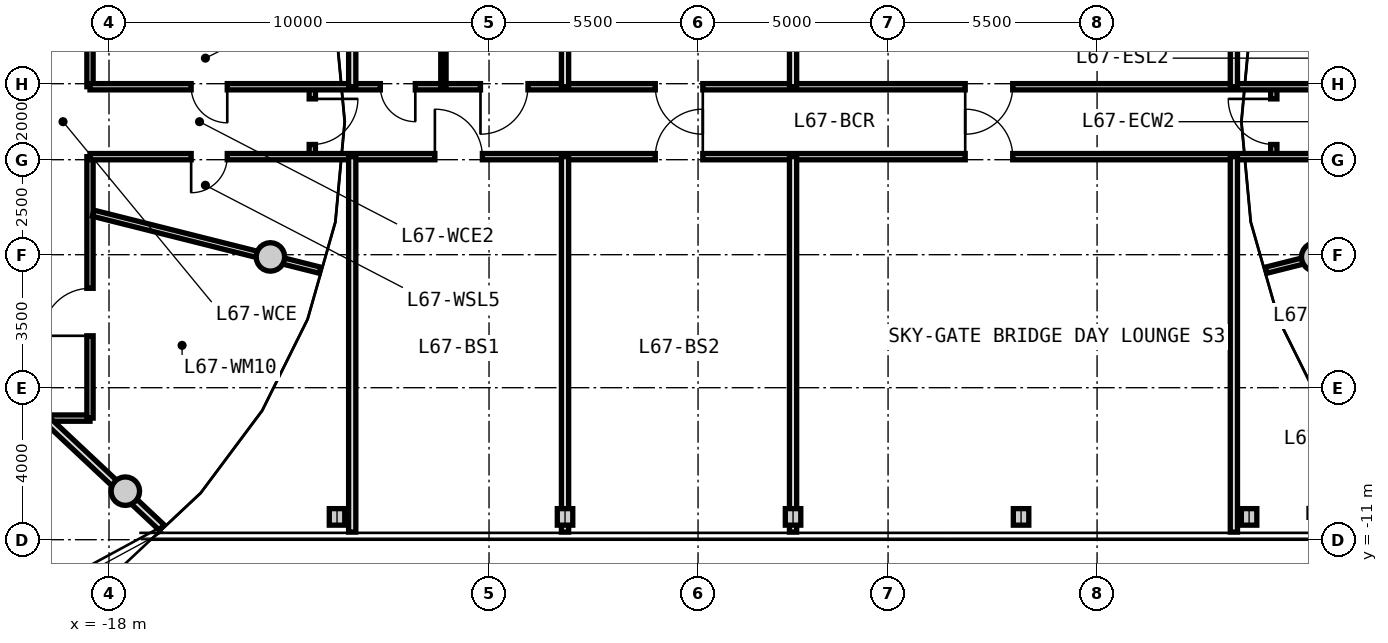
"""IFC4 building model, lengths in metres.
Left out: names, types, materials, properties, quantities, classifications, styles, units other than length and angle.
Written with IfcOpenShell. Run it as: python <this file> out.ifc"""

import sys

from ifc_helpers import new_model, si_unit, direction, frame, frame_2d, origin, origin_2d, place, context, subcontext, project, spatial, rectangle, circle, i_section, extrude, source, transform, mapped, element, fill, save


model = new_model("IFC4")
c1 = context("Model", 3, precision=1e-05, world=origin(), true_north=direction((0.0, 1.0)))
c2 = subcontext(c1, "Body", "Model", "MODEL_VIEW")
j1 = project(units=[si_unit("LENGTHUNIT", "METRE"), si_unit("PLANEANGLEUNIT", "RADIAN")], contexts=[c1])
p1 = place(None, origin())
s1 = spatial("IfcSite", under=j1, at=p1, CompositionType="ELEMENT")
p2 = place(p1, origin())
s2 = spatial("IfcBuilding", under=s1, at=p2, CompositionType="ELEMENT")
p3 = place(p2, frame((0.0, 0.0, 216.95)))
s3 = spatial("IfcBuildingStorey", under=s2, at=p3, CompositionType="ELEMENT", Elevation=216.95)
m1 = source(origin(), c2, "Body", "SweptSolid", [
    extrude(circle(Radius=0.375, at=origin_2d()), origin(), (0.0, 0.0, 1.0), 3.05),
])
for number, where, z_axis, x_axis in (
    (1, (-17.57, -9.723, 0.0), (0.0, 0.0, 1.0), (1.0, 0.0, 0.0)),
    (2, (-13.753, -3.559, 0.0), (0.0, 0.0, 1.0), (1.0, 0.0, 0.0)),
    (3, (13.753, -3.559, 0.0), (0.0, 0.0, 1.0), (1.0, 0.0, 0.0)),
):
    element("IfcColumn", number, at=place(p3, frame(where, z_axis=z_axis, x_axis=x_axis)), inside=s3, PredefinedType="COLUMN", context=c2, shape_type="MappedRepresentation", body=[
        mapped(m1, transform((0.0, 0.0, 0.0), x_axis=(1.0, 0.0, 0.0), y_axis=(0.0, 1.0, 0.0), z_axis=(0.0, 0.0, 1.0), scale=1.0)),
    ])
m2 = source(origin(), c2, "Body", "SweptSolid", [
    extrude(i_section(OverallWidth=0.407, OverallDepth=0.435, WebThickness=0.024, FlangeThickness=0.039, FilletRadius=0.015, at=origin_2d()), origin(), (0.0, 0.0, 1.0), 3.05),
])
for number, where, z_axis, x_axis in (
    (4, (-12.0, -10.4, 0.0), (0.0, 0.0, 1.0), (1.0, 0.0, 0.0)),
    (5, (-6.0, -10.4, 0.0), (0.0, 0.0, 1.0), (1.0, 0.0, 0.0)),
    (6, (0.0, -10.4, 0.0), (0.0, 0.0, 1.0), (1.0, 0.0, 0.0)),
    (7, (6.0, -10.4, 0.0), (0.0, 0.0, 1.0), (1.0, 0.0, 0.0)),
    (8, (12.0, -10.4, 0.0), (0.0, 0.0, 1.0), (1.0, 0.0, 0.0)),
):
    element("IfcColumn", number, at=place(p3, frame(where, z_axis=z_axis, x_axis=x_axis)), inside=s3, PredefinedType="COLUMN", context=c2, shape_type="MappedRepresentation", body=[
        mapped(m2, transform((0.0, 0.0, 0.0), x_axis=(1.0, 0.0, 0.0), y_axis=(0.0, 1.0, 0.0), z_axis=(0.0, 0.0, 1.0), scale=1.0)),
    ])
m3 = source(origin(), c2, "Body", "SweptSolid", [
    extrude(rectangle(XDim=19.0, YDim=0.165, at=frame_2d((9.5, 0.0))), origin(), (0.0, 0.0, 1.0), 2.745),
])
p4 = place(p3, frame((-18.5, -7.8, 0.0), z_axis=(0.0, 0.0, 1.0), x_axis=(-1.0, 0.0, 0.0)))
e9 = element("IfcWall", 9, at=p4, inside=s3, PredefinedType="PARTITIONING", context=c2, shape_type="MappedRepresentation", body=[
    mapped(m3, transform((0.0, 0.0, 0.0), x_axis=(1.0, 0.0, 0.0), y_axis=(0.0, 1.0, 0.0), z_axis=(0.0, 0.0, 1.0), scale=1.0)),
])
p5 = place(p4, frame((14.191, 0.0, 0.0)))
e10 = element("IfcOpeningElement", 10, at=p5, cuts=e9, PredefinedType="OPENING", context=c2, shape_type="SweptSolid", body=[
    extrude(rectangle(XDim=1.25, YDim=2.2, at=frame_2d((0.625, 1.1))), frame((0.0, 0.093, 0.0), z_axis=(0.0, -1.0, 0.0), x_axis=(1.0, 0.0, 0.0)), (0.0, 0.0, 1.0), 0.185),
])
p6 = place(p4, frame((8.875, 0.0, 0.0)))
e11 = element("IfcOpeningElement", 11, at=p6, cuts=e9, PredefinedType="OPENING", context=c2, shape_type="SweptSolid", body=[
    extrude(rectangle(XDim=1.25, YDim=2.2, at=frame_2d((0.625, 1.1))), frame((0.0, 0.093, 0.0), z_axis=(0.0, -1.0, 0.0), x_axis=(1.0, 0.0, 0.0)), (0.0, 0.0, 1.0), 0.185),
])
p7 = place(p4, frame((3.559, 0.0, 0.0)))
e12 = element("IfcOpeningElement", 12, at=p7, cuts=e9, PredefinedType="OPENING", context=c2, shape_type="SweptSolid", body=[
    extrude(rectangle(XDim=1.25, YDim=2.2, at=frame_2d((0.625, 1.1))), frame((0.0, 0.093, 0.0), z_axis=(0.0, -1.0, 0.0), x_axis=(1.0, 0.0, 0.0)), (0.0, 0.0, 1.0), 0.185),
])
m4 = source(origin(), c2, "Body", "SweptSolid", [
    extrude(rectangle(XDim=6.88, YDim=0.165, at=frame_2d((3.44, 0.0))), origin(), (0.0, 0.0, 1.0), 2.745),
])
p8 = place(p3, frame((-18.5, 7.8, 0.0), z_axis=(0.0, 0.0, 1.0), x_axis=(0.0, -1.0, 0.0)))
e13 = element("IfcWall", 13, at=p8, inside=s3, PredefinedType="PARTITIONING", context=c2, shape_type="MappedRepresentation", body=[
    mapped(m4, transform((0.0, 0.0, 0.0), x_axis=(1.0, 0.0, 0.0), y_axis=(0.0, 1.0, 0.0), z_axis=(0.0, 0.0, 1.0), scale=1.0)),
])
p9 = place(p8, frame((3.421, 0.0, 0.0)))
e14 = element("IfcOpeningElement", 14, at=p9, cuts=e13, PredefinedType="OPENING", context=c2, shape_type="SweptSolid", body=[
    extrude(rectangle(XDim=1.05, YDim=2.15, at=frame_2d((0.525, 1.075))), frame((0.0, 0.093, 0.0), z_axis=(0.0, -1.0, 0.0), x_axis=(1.0, 0.0, 0.0)), (0.0, 0.0, 1.0), 0.185),
])
p10 = place(p8, frame((0.856, 0.0, 0.0)))
e15 = element("IfcOpeningElement", 15, at=p10, cuts=e13, PredefinedType="OPENING", context=c2, shape_type="SweptSolid", body=[
    extrude(rectangle(XDim=1.05, YDim=2.15, at=frame_2d((0.525, 1.075))), frame((0.0, 0.093, 0.0), z_axis=(0.0, -1.0, 0.0), x_axis=(1.0, 0.0, 0.0)), (0.0, 0.0, 1.0), 0.185),
])
p11 = place(p3, frame((-18.5, -0.92, 0.0), z_axis=(0.0, 0.0, 1.0), x_axis=(0.0, -1.0, 0.0)))
e16 = element("IfcWall", 16, at=p11, inside=s3, PredefinedType="PARTITIONING", context=c2, shape_type="MappedRepresentation", body=[
    mapped(m4, transform((0.0, 0.0, 0.0), x_axis=(1.0, 0.0, 0.0), y_axis=(0.0, 1.0, 0.0), z_axis=(0.0, 0.0, 1.0), scale=1.0)),
])
p12 = place(p11, frame((3.464, 0.0, 0.0)))
e17 = element("IfcOpeningElement", 17, at=p12, cuts=e16, PredefinedType="OPENING", context=c2, shape_type="SweptSolid", body=[
    extrude(rectangle(XDim=1.25, YDim=2.2, at=frame_2d((0.625, 1.1))), frame((0.0, 0.093, 0.0), z_axis=(0.0, -1.0, 0.0), x_axis=(1.0, 0.0, 0.0)), (0.0, 0.0, 1.0), 0.185),
])
m5 = source(origin(), c2, "Body", "SweptSolid", [
    extrude(rectangle(XDim=6.157, YDim=0.165, at=frame_2d((3.079, 0.0))), origin(), (0.0, 0.0, 1.0), 2.345),
])
p13 = place(p3, frame((-18.42, -2.407, 0.0), z_axis=(0.0, 0.0, 1.0), x_axis=(0.969840867184, -0.243738984038, 0.0)))
e18 = element("IfcWall", 18, at=p13, inside=s3, PredefinedType="PARTITIONING", context=c2, shape_type="MappedRepresentation", body=[
    mapped(m5, transform((0.0, 0.0, 0.0), x_axis=(1.0, 0.0, 0.0), y_axis=(0.0, 1.0, 0.0), z_axis=(0.0, 0.0, 1.0), scale=1.0)),
])
m6 = source(origin(), c2, "Body", "SweptSolid", [
    extrude(rectangle(XDim=4.089, YDim=0.19, at=frame_2d((2.044, 0.0))), origin(), (0.0, 0.0, 1.0), 2.345),
])
p14 = place(p3, frame((-19.598, -7.88, 0.0), z_axis=(0.0, 0.0, 1.0), x_axis=(0.729401273609, -0.684086092577, 0.0)))
e19 = element("IfcWall", 19, at=p14, inside=s3, PredefinedType="PARTITIONING", context=c2, shape_type="MappedRepresentation", body=[
    mapped(m6, transform((0.0, 0.0, 0.0), x_axis=(1.0, 0.0, 0.0), y_axis=(0.0, 1.0, 0.0), z_axis=(0.0, 0.0, 1.0), scale=1.0)),
])
p15 = place(p3, frame((18.42, -2.407, 0.0), z_axis=(0.0, 0.0, 1.0), x_axis=(-0.969840867184, -0.243738984038, 0.0)))
e20 = element("IfcWall", 20, at=p15, inside=s3, PredefinedType="PARTITIONING", context=c2, shape_type="MappedRepresentation", body=[
    mapped(m5, transform((0.0, 0.0, 0.0), x_axis=(1.0, 0.0, 0.0), y_axis=(0.0, 1.0, 0.0), z_axis=(0.0, 0.0, 1.0), scale=1.0)),
])
m7 = source(origin(), c2, "Body", "SweptSolid", [
    extrude(rectangle(XDim=1.84, YDim=0.165, at=frame_2d((0.92, 0.0))), origin(), (0.0, 0.0, 1.0), 2.745),
])
p16 = place(p3, frame((-12.65, -0.92, 0.0), z_axis=(0.0, 0.0, 1.0), x_axis=(0.0, 1.0, 0.0)))
e21 = element("IfcWall", 21, at=p16, inside=s3, PredefinedType="PARTITIONING", context=c2, shape_type="MappedRepresentation", body=[
    mapped(m7, transform((0.0, 0.0, 0.0), x_axis=(1.0, 0.0, 0.0), y_axis=(0.0, 1.0, 0.0), z_axis=(0.0, 0.0, 1.0), scale=1.0)),
])
p17 = place(p16, frame((0.32, 0.0, 0.0)))
e22 = element("IfcOpeningElement", 22, at=p17, cuts=e21, PredefinedType="OPENING", context=c2, shape_type="SweptSolid", body=[
    extrude(rectangle(XDim=1.2, YDim=2.15, at=frame_2d((0.6, 1.075))), frame((0.0, 0.093, 0.0), z_axis=(0.0, -1.0, 0.0), x_axis=(1.0, 0.0, 0.0)), (0.0, 0.0, 1.0), 0.185),
])
p18 = place(p3, frame((12.65, -0.92, 0.0), z_axis=(0.0, 0.0, 1.0), x_axis=(0.0, 1.0, 0.0)))
e23 = element("IfcWall", 23, at=p18, inside=s3, PredefinedType="PARTITIONING", context=c2, shape_type="MappedRepresentation", body=[
    mapped(m7, transform((0.0, 0.0, 0.0), x_axis=(1.0, 0.0, 0.0), y_axis=(0.0, 1.0, 0.0), z_axis=(0.0, 0.0, 1.0), scale=1.0)),
])
p19 = place(p18, frame((0.32, 0.0, 0.0)))
e24 = element("IfcOpeningElement", 24, at=p19, cuts=e23, PredefinedType="OPENING", context=c2, shape_type="SweptSolid", body=[
    extrude(rectangle(XDim=1.2, YDim=2.15, at=frame_2d((0.6, 1.075))), frame((0.0, 0.093, 0.0), z_axis=(0.0, -1.0, 0.0), x_axis=(1.0, 0.0, 0.0)), (0.0, 0.0, 1.0), 0.185),
])
m8 = source(origin(), c2, "Body", "SweptSolid", [
    extrude(rectangle(XDim=37.0, YDim=0.165, at=frame_2d((18.5, 0.0))), origin(), (0.0, 0.0, 1.0), 2.745),
])
p20 = place(p3, frame((-18.5, -0.92, 0.0), z_axis=(0.0, 0.0, 1.0), x_axis=(1.0, 0.0, 0.0)))
e25 = element("IfcWall", 25, at=p20, inside=s3, PredefinedType="PARTITIONING", context=c2, shape_type="MappedRepresentation", body=[
    mapped(m8, transform((0.0, 0.0, 0.0), x_axis=(1.0, 0.0, 0.0), y_axis=(0.0, 1.0, 0.0), z_axis=(0.0, 0.0, 1.0), scale=1.0)),
])
p21 = place(p20, frame((2.662, 0.0, 0.0)))
e26 = element("IfcOpeningElement", 26, at=p21, cuts=e25, PredefinedType="OPENING", context=c2, shape_type="SweptSolid", body=[
    extrude(rectangle(XDim=0.95, YDim=2.1, at=frame_2d((0.475, 1.05))), frame((0.0, 0.093, 0.0), z_axis=(0.0, -1.0, 0.0), x_axis=(1.0, 0.0, 0.0)), (0.0, 0.0, 1.0), 0.185),
])
p22 = place(p20, frame((33.388, 0.0, 0.0)))
e27 = element("IfcOpeningElement", 27, at=p22, cuts=e25, PredefinedType="OPENING", context=c2, shape_type="SweptSolid", body=[
    extrude(rectangle(XDim=0.95, YDim=2.1, at=frame_2d((0.475, 1.05))), frame((0.0, 0.093, 0.0), z_axis=(0.0, -1.0, 0.0), x_axis=(1.0, 0.0, 0.0)), (0.0, 0.0, 1.0), 0.185),
])
p23 = place(p20, frame((9.075, 0.0, 0.0)))
e28 = element("IfcOpeningElement", 28, at=p23, cuts=e25, PredefinedType="OPENING", context=c2, shape_type="SweptSolid", body=[
    extrude(rectangle(XDim=1.25, YDim=2.2, at=frame_2d((0.625, 1.1))), frame((0.0, 0.093, 0.0), z_axis=(0.0, -1.0, 0.0), x_axis=(1.0, 0.0, 0.0)), (0.0, 0.0, 1.0), 0.185),
])
p24 = place(p20, frame((14.875, 0.0, 0.0)))
e29 = element("IfcOpeningElement", 29, at=p24, cuts=e25, PredefinedType="OPENING", context=c2, shape_type="SweptSolid", body=[
    extrude(rectangle(XDim=1.25, YDim=2.2, at=frame_2d((0.625, 1.1))), frame((0.0, 0.093, 0.0), z_axis=(0.0, -1.0, 0.0), x_axis=(1.0, 0.0, 0.0)), (0.0, 0.0, 1.0), 0.185),
])
p25 = place(p20, frame((23.03, 0.0, 0.0)))
e30 = element("IfcOpeningElement", 30, at=p25, cuts=e25, PredefinedType="OPENING", context=c2, shape_type="SweptSolid", body=[
    extrude(rectangle(XDim=1.25, YDim=2.2, at=frame_2d((0.625, 1.1))), frame((0.0, 0.093, 0.0), z_axis=(0.0, -1.0, 0.0), x_axis=(1.0, 0.0, 0.0)), (0.0, 0.0, 1.0), 0.185),
])
p26 = place(p3, frame((-18.5, 0.92, 0.0), z_axis=(0.0, 0.0, 1.0), x_axis=(1.0, 0.0, 0.0)))
e31 = element("IfcWall", 31, at=p26, inside=s3, PredefinedType="PARTITIONING", context=c2, shape_type="MappedRepresentation", body=[
    mapped(m8, transform((0.0, 0.0, 0.0), x_axis=(1.0, 0.0, 0.0), y_axis=(0.0, 1.0, 0.0), z_axis=(0.0, 0.0, 1.0), scale=1.0)),
])
p27 = place(p26, frame((2.662, 0.0, 0.0)))
e32 = element("IfcOpeningElement", 32, at=p27, cuts=e31, PredefinedType="OPENING", context=c2, shape_type="SweptSolid", body=[
    extrude(rectangle(XDim=0.95, YDim=2.1, at=frame_2d((0.475, 1.05))), frame((0.0, 0.093, 0.0), z_axis=(0.0, -1.0, 0.0), x_axis=(1.0, 0.0, 0.0)), (0.0, 0.0, 1.0), 0.185),
])
p28 = place(p26, frame((33.388, 0.0, 0.0)))
e33 = element("IfcOpeningElement", 33, at=p28, cuts=e31, PredefinedType="OPENING", context=c2, shape_type="SweptSolid", body=[
    extrude(rectangle(XDim=0.95, YDim=2.1, at=frame_2d((0.475, 1.05))), frame((0.0, 0.093, 0.0), z_axis=(0.0, -1.0, 0.0), x_axis=(1.0, 0.0, 0.0)), (0.0, 0.0, 1.0), 0.185),
])
p29 = place(p26, frame((7.64, 0.0, 0.0)))
e34 = element("IfcOpeningElement", 34, at=p29, cuts=e31, PredefinedType="OPENING", context=c2, shape_type="SweptSolid", body=[
    extrude(rectangle(XDim=0.92, YDim=2.1, at=frame_2d((0.46, 1.05))), frame((0.0, 0.093, 0.0), z_axis=(0.0, -1.0, 0.0), x_axis=(1.0, 0.0, 0.0)), (0.0, 0.0, 1.0), 0.185),
])
p30 = place(p26, frame((10.275, 0.0, 0.0)))
e35 = element("IfcOpeningElement", 35, at=p30, cuts=e31, PredefinedType="OPENING", context=c2, shape_type="SweptSolid", body=[
    extrude(rectangle(XDim=1.25, YDim=2.2, at=frame_2d((0.625, 1.1))), frame((0.0, 0.093, 0.0), z_axis=(0.0, -1.0, 0.0), x_axis=(1.0, 0.0, 0.0)), (0.0, 0.0, 1.0), 0.185),
])
p31 = place(p26, frame((14.875, 0.0, 0.0)))
e36 = element("IfcOpeningElement", 36, at=p31, cuts=e31, PredefinedType="OPENING", context=c2, shape_type="SweptSolid", body=[
    extrude(rectangle(XDim=1.25, YDim=2.2, at=frame_2d((0.625, 1.1))), frame((0.0, 0.093, 0.0), z_axis=(0.0, -1.0, 0.0), x_axis=(1.0, 0.0, 0.0)), (0.0, 0.0, 1.0), 0.185),
])
p32 = place(p26, frame((23.03, 0.0, 0.0)))
e37 = element("IfcOpeningElement", 37, at=p32, cuts=e31, PredefinedType="OPENING", context=c2, shape_type="SweptSolid", body=[
    extrude(rectangle(XDim=1.25, YDim=2.2, at=frame_2d((0.625, 1.1))), frame((0.0, 0.093, 0.0), z_axis=(0.0, -1.0, 0.0), x_axis=(1.0, 0.0, 0.0)), (0.0, 0.0, 1.0), 0.185),
])
m9 = source(origin(), c2, "Body", "SweptSolid", [
    extrude(rectangle(XDim=9.88, YDim=0.19, at=frame_2d((4.94, 0.0))), origin(), (0.0, 0.0, 1.0), 2.745),
])
for number, where, z_axis, x_axis in (
    (38, (-11.6, -10.8, 0.0), (0.0, 0.0, 1.0), (0.0, 1.0, 0.0)),
    (39, (-11.6, 0.92, 0.0), (0.0, 0.0, 1.0), (0.0, 1.0, 0.0)),
    (40, (11.6, -10.8, 0.0), (0.0, 0.0, 1.0), (0.0, 1.0, 0.0)),
    (41, (11.6, 0.92, 0.0), (0.0, 0.0, 1.0), (0.0, 1.0, 0.0)),
):
    element("IfcWall", number, at=place(p3, frame(where, z_axis=z_axis, x_axis=x_axis)), inside=s3, PredefinedType="PARTITIONING", context=c2, shape_type="MappedRepresentation", body=[
        mapped(m9, transform((0.0, 0.0, 0.0), x_axis=(1.0, 0.0, 0.0), y_axis=(0.0, 1.0, 0.0), z_axis=(0.0, 0.0, 1.0), scale=1.0)),
    ])
m10 = source(origin(), c2, "Body", "SweptSolid", [
    extrude(rectangle(XDim=9.88, YDim=0.19, at=frame_2d((4.94, 0.0))), origin(), (0.0, 0.0, 1.0), 2.045),
])
for number, where, z_axis, x_axis in (
    (42, (-6.0, -10.8, 0.0), (0.0, 0.0, 1.0), (0.0, 1.0, 0.0)),
    (43, (-6.0, 0.92, 0.0), (0.0, 0.0, 1.0), (0.0, 1.0, 0.0)),
):
    element("IfcWall", number, at=place(p3, frame(where, z_axis=z_axis, x_axis=x_axis)), inside=s3, PredefinedType="PARTITIONING", context=c2, shape_type="MappedRepresentation", body=[
        mapped(m10, transform((0.0, 0.0, 0.0), x_axis=(1.0, 0.0, 0.0), y_axis=(0.0, 1.0, 0.0), z_axis=(0.0, 0.0, 1.0), scale=1.0)),
    ])
m11 = source(origin(), c2, "Body", "SweptSolid", [
    extrude(rectangle(XDim=9.88, YDim=0.14, at=frame_2d((4.94, 0.0))), origin(), (0.0, 0.0, 1.0), 2.745),
])
p33 = place(p3, frame((-9.2, 0.92, 0.0), z_axis=(0.0, 0.0, 1.0), x_axis=(0.0, 1.0, 0.0)))
e44 = element("IfcWall", 44, at=p33, inside=s3, PredefinedType="PARTITIONING", context=c2, shape_type="MappedRepresentation", body=[
    mapped(m11, transform((0.0, 0.0, 0.0), x_axis=(1.0, 0.0, 0.0), y_axis=(0.0, 1.0, 0.0), z_axis=(0.0, 0.0, 1.0), scale=1.0)),
])
for number, where, z_axis, x_axis in (
    (45, (0.0, -10.8, 0.0), (0.0, 0.0, 1.0), (0.0, 1.0, 0.0)),
    (46, (0.0, 0.92, 0.0), (0.0, 0.0, 1.0), (0.0, 1.0, 0.0)),
):
    element("IfcWall", number, at=place(p3, frame(where, z_axis=z_axis, x_axis=x_axis)), inside=s3, PredefinedType="PARTITIONING", context=c2, shape_type="MappedRepresentation", body=[
        mapped(m10, transform((0.0, 0.0, 0.0), x_axis=(1.0, 0.0, 0.0), y_axis=(0.0, 1.0, 0.0), z_axis=(0.0, 0.0, 1.0), scale=1.0)),
    ])
m12 = source(origin(), c2, "Body", "SweptSolid", [
    extrude(rectangle(XDim=0.95, YDim=2.1, at=frame_2d((0.475, 1.05))), frame((0.0, 0.025, 0.0), z_axis=(0.0, -1.0, 0.0), x_axis=(1.0, 0.0, 0.0)), (0.0, 0.0, 1.0), 0.05),
])
p34 = place(p21, frame((0.95, 0.0, 0.0), z_axis=(0.0, 0.0, 1.0), x_axis=(-1.0, 0.0, 0.0)))
e47 = element("IfcDoor", 47, at=p34, inside=s3, OperationType="SINGLE_SWING_RIGHT", PredefinedType="DOOR", context=c2, shape_type="MappedRepresentation", body=[
    mapped(m12, transform((0.0, 0.0, 0.0), x_axis=(1.0, 0.0, 0.0), y_axis=(0.0, 1.0, 0.0), z_axis=(0.0, 0.0, 1.0), scale=1.0)),
])
fill(e26, e47)
p35 = place(p27, frame((0.95, 0.0, 0.0), z_axis=(0.0, 0.0, 1.0), x_axis=(-1.0, 0.0, 0.0)))
e48 = element("IfcDoor", 48, at=p35, inside=s3, OperationType="SINGLE_SWING_LEFT", PredefinedType="DOOR", context=c2, shape_type="MappedRepresentation", body=[
    mapped(m12, transform((0.0, 0.0, 0.0), x_axis=(1.0, 0.0, 0.0), y_axis=(0.0, 1.0, 0.0), z_axis=(0.0, 0.0, 1.0), scale=1.0)),
])
fill(e32, e48)
m13 = source(origin(), c2, "Body", "SweptSolid", [
    extrude(rectangle(XDim=1.25, YDim=2.2, at=frame_2d((0.625, 1.1))), frame((0.0, 0.025, 0.0), z_axis=(0.0, -1.0, 0.0), x_axis=(1.0, 0.0, 0.0)), (0.0, 0.0, 1.0), 0.05),
])
p36 = place(p12, frame((1.25, 0.0, 0.0), z_axis=(0.0, 0.0, 1.0), x_axis=(-1.0, 0.0, 0.0)))
e49 = element("IfcDoor", 49, at=p36, inside=s3, OperationType="SINGLE_SWING_LEFT", PredefinedType="DOOR", context=c2, shape_type="MappedRepresentation", body=[
    mapped(m13, transform((0.0, 0.0, 0.0), x_axis=(1.0, 0.0, 0.0), y_axis=(0.0, 1.0, 0.0), z_axis=(0.0, 0.0, 1.0), scale=1.0)),
])
fill(e17, e49)
m14 = source(origin(), c2, "Body", "SweptSolid", [
    extrude(rectangle(XDim=1.2, YDim=2.15, at=frame_2d((0.6, 1.075))), frame((0.0, 0.025, 0.0), z_axis=(0.0, -1.0, 0.0), x_axis=(1.0, 0.0, 0.0)), (0.0, 0.0, 1.0), 0.05),
])
p37 = place(p17, frame((1.2, 0.0, 0.0), z_axis=(0.0, 0.0, 1.0), x_axis=(-1.0, 0.0, 0.0)))
e50 = element("IfcDoor", 50, at=p37, inside=s3, OperationType="SINGLE_SWING_LEFT", PredefinedType="DOOR", context=c2, shape_type="MappedRepresentation", body=[
    mapped(m14, transform((0.0, 0.0, 0.0), x_axis=(1.0, 0.0, 0.0), y_axis=(0.0, 1.0, 0.0), z_axis=(0.0, 0.0, 1.0), scale=1.0)),
])
fill(e22, e50)
p38 = place(p19, origin())
e51 = element("IfcDoor", 51, at=p38, inside=s3, OperationType="SINGLE_SWING_RIGHT", PredefinedType="DOOR", context=c2, shape_type="MappedRepresentation", body=[
    mapped(m14, transform((0.0, 0.0, 0.0), x_axis=(1.0, 0.0, 0.0), y_axis=(0.0, 1.0, 0.0), z_axis=(0.0, 0.0, 1.0), scale=1.0)),
])
fill(e24, e51)
p39 = place(p23, origin())
e52 = element("IfcDoor", 52, at=p39, inside=s3, OperationType="SINGLE_SWING_LEFT", PredefinedType="DOOR", context=c2, shape_type="MappedRepresentation", body=[
    mapped(m13, transform((0.0, 0.0, 0.0), x_axis=(1.0, 0.0, 0.0), y_axis=(0.0, 1.0, 0.0), z_axis=(0.0, 0.0, 1.0), scale=1.0)),
])
fill(e28, e52)
m15 = source(origin(), c2, "Body", "SweptSolid", [
    extrude(rectangle(XDim=0.92, YDim=2.1, at=frame_2d((0.46, 1.05))), frame((0.0, 0.025, 0.0), z_axis=(0.0, -1.0, 0.0), x_axis=(1.0, 0.0, 0.0)), (0.0, 0.0, 1.0), 0.05),
])
p40 = place(p29, frame((0.92, 0.0, 0.0), z_axis=(0.0, 0.0, 1.0), x_axis=(-1.0, 0.0, 0.0)))
e53 = element("IfcDoor", 53, at=p40, inside=s3, OperationType="SINGLE_SWING_LEFT", PredefinedType="DOOR", context=c2, shape_type="MappedRepresentation", body=[
    mapped(m15, transform((0.0, 0.0, 0.0), x_axis=(1.0, 0.0, 0.0), y_axis=(0.0, 1.0, 0.0), z_axis=(0.0, 0.0, 1.0), scale=1.0)),
])
fill(e34, e53)
p41 = place(p30, frame((1.25, 0.0, 0.0), z_axis=(0.0, 0.0, 1.0), x_axis=(-1.0, 0.0, 0.0)))
e54 = element("IfcDoor", 54, at=p41, inside=s3, OperationType="SINGLE_SWING_RIGHT", PredefinedType="DOOR", context=c2, shape_type="MappedRepresentation", body=[
    mapped(m13, transform((0.0, 0.0, 0.0), x_axis=(1.0, 0.0, 0.0), y_axis=(0.0, 1.0, 0.0), z_axis=(0.0, 0.0, 1.0), scale=1.0)),
])
fill(e35, e54)
p42 = place(p24, origin())
e55 = element("IfcDoor", 55, at=p42, inside=s3, OperationType="SINGLE_SWING_RIGHT", PredefinedType="DOOR", context=c2, shape_type="MappedRepresentation", body=[
    mapped(m13, transform((0.0, 0.0, 0.0), x_axis=(1.0, 0.0, 0.0), y_axis=(0.0, 1.0, 0.0), z_axis=(0.0, 0.0, 1.0), scale=1.0)),
])
fill(e29, e55)
p43 = place(p31, frame((1.25, 0.0, 0.0), z_axis=(0.0, 0.0, 1.0), x_axis=(-1.0, 0.0, 0.0)))
e56 = element("IfcDoor", 56, at=p43, inside=s3, OperationType="SINGLE_SWING_LEFT", PredefinedType="DOOR", context=c2, shape_type="MappedRepresentation", body=[
    mapped(m13, transform((0.0, 0.0, 0.0), x_axis=(1.0, 0.0, 0.0), y_axis=(0.0, 1.0, 0.0), z_axis=(0.0, 0.0, 1.0), scale=1.0)),
])
fill(e36, e56)
p44 = place(p25, origin())
e57 = element("IfcDoor", 57, at=p44, inside=s3, OperationType="SINGLE_SWING_LEFT", PredefinedType="DOOR", context=c2, shape_type="MappedRepresentation", body=[
    mapped(m13, transform((0.0, 0.0, 0.0), x_axis=(1.0, 0.0, 0.0), y_axis=(0.0, 1.0, 0.0), z_axis=(0.0, 0.0, 1.0), scale=1.0)),
])
fill(e30, e57)
p45 = place(p32, frame((1.25, 0.0, 0.0), z_axis=(0.0, 0.0, 1.0), x_axis=(-1.0, 0.0, 0.0)))
e58 = element("IfcDoor", 58, at=p45, inside=s3, OperationType="SINGLE_SWING_RIGHT", PredefinedType="DOOR", context=c2, shape_type="MappedRepresentation", body=[
    mapped(m13, transform((0.0, 0.0, 0.0), x_axis=(1.0, 0.0, 0.0), y_axis=(0.0, 1.0, 0.0), z_axis=(0.0, 0.0, 1.0), scale=1.0)),
])
fill(e37, e58)
save(model, sys.argv[1])
